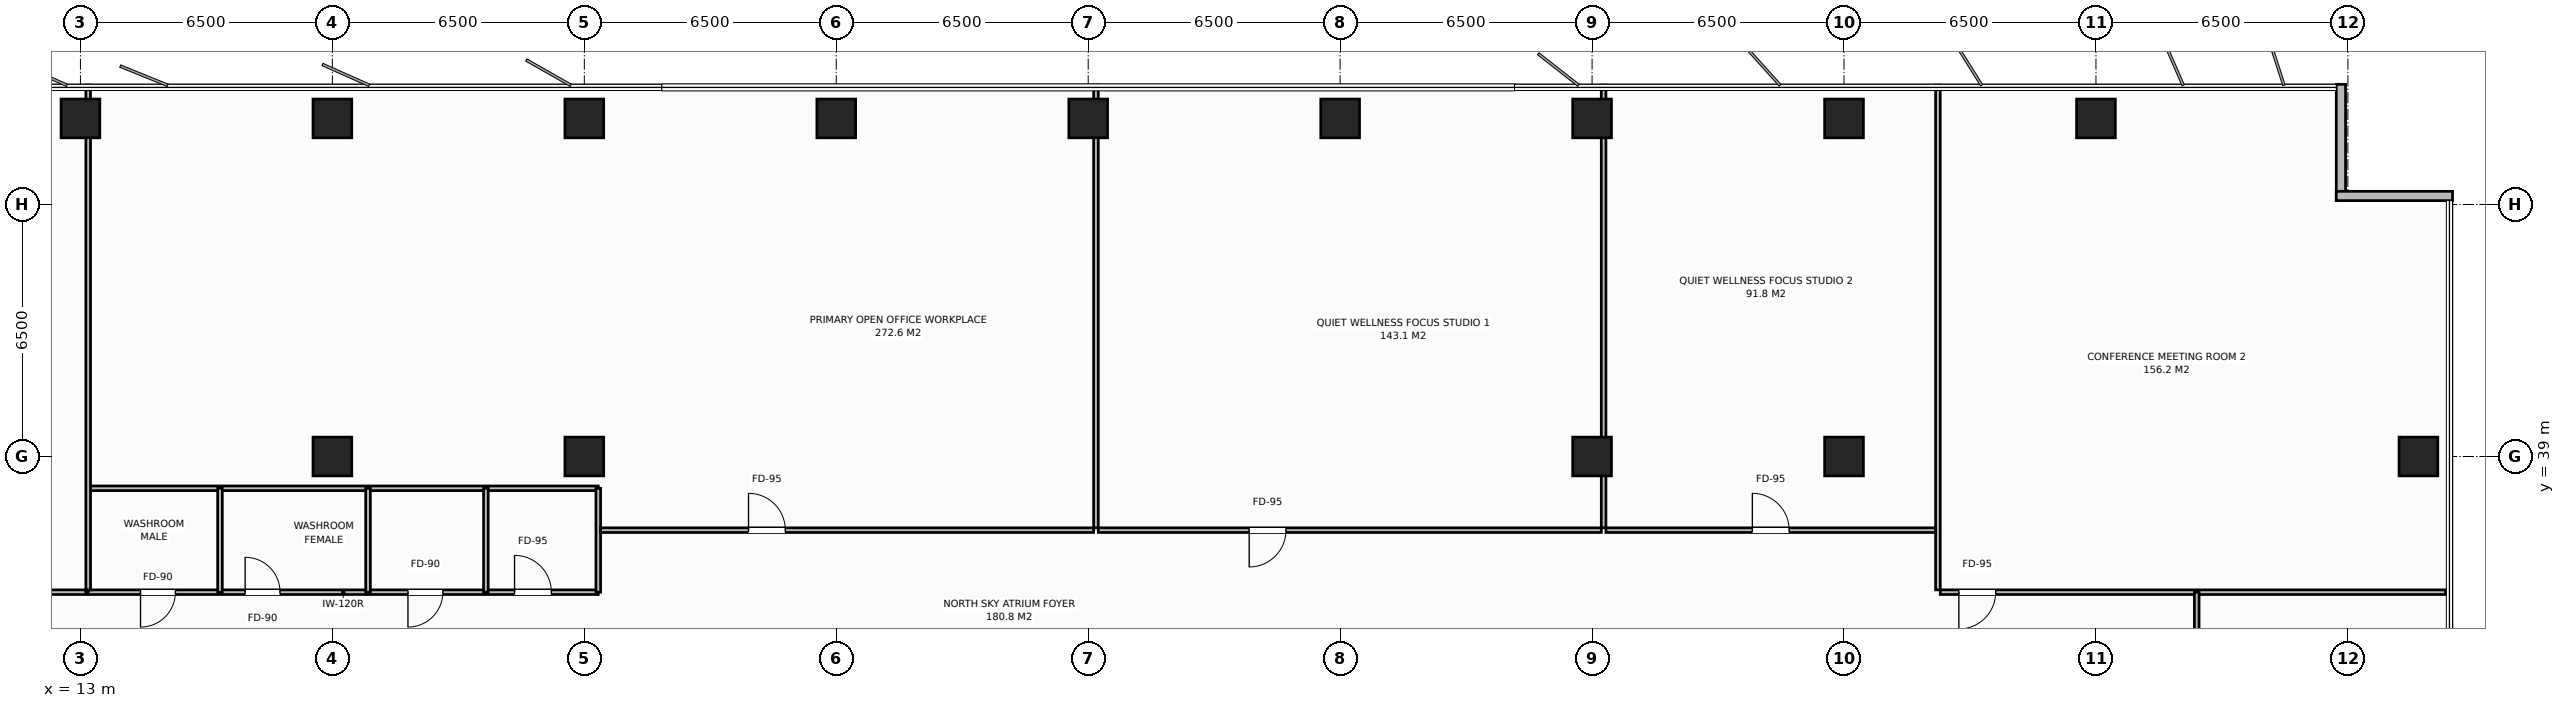
"""IFC4 building model, lengths in metres.
Left out: names, types, materials, properties, quantities, classifications, styles, units other than length and angle.
Written with IfcOpenShell. Run it as: python <this file> out.ifc"""

import sys

from ifc_helpers import new_model, si_unit, direction, frame, frame_2d, origin, origin_2d, place, context, subcontext, project, spatial, rectangle, extrude, element, fill, save


model = new_model("IFC4")
c1 = context("Model", 3, precision=1e-05, world=origin(), true_north=direction((0.0, 1.0)))
c2 = subcontext(c1, "Body", "Model", "MODEL_VIEW")
j1 = project(units=[si_unit("LENGTHUNIT", "METRE"), si_unit("PLANEANGLEUNIT", "RADIAN")], contexts=[c1])
p1 = place(None, origin())
s1 = spatial("IfcSite", under=j1, at=p1, CompositionType="ELEMENT")
p2 = place(p1, origin())
s2 = spatial("IfcBuilding", under=s1, at=p2, CompositionType="ELEMENT")
p3 = place(p2, frame((0.0, 0.0, 148.0)))
s3 = spatial("IfcBuildingStorey", under=s2, at=p3, CompositionType="ELEMENT", Elevation=148.0)
for number, where, z_axis, x_axis in (
    (1, (19.5, 39.0, 0.0), (0.0, 0.0, 1.0), (1.0, 0.0, 0.0)),
    (2, (58.5, 39.0, 0.0), (0.0, 0.0, 1.0), (1.0, 0.0, 0.0)),
    (3, (26.0, 39.0, 0.0), (0.0, 0.0, 1.0), (1.0, 0.0, 0.0)),
    (4, (52.0, 39.0, 0.0), (0.0, 0.0, 1.0), (1.0, 0.0, 0.0)),
    (5, (13.0, 47.72, 0.0), (0.0, 0.0, 1.0), (1.0, 0.0, 0.0)),
    (6, (19.5, 47.72, 0.0), (0.0, 0.0, 1.0), (1.0, 0.0, 0.0)),
    (7, (26.0, 47.72, 0.0), (0.0, 0.0, 1.0), (1.0, 0.0, 0.0)),
    (8, (32.5, 47.72, 0.0), (0.0, 0.0, 1.0), (1.0, 0.0, 0.0)),
    (9, (39.0, 47.72, 0.0), (0.0, 0.0, 1.0), (1.0, 0.0, 0.0)),
    (10, (45.5, 47.72, 0.0), (0.0, 0.0, 1.0), (1.0, 0.0, 0.0)),
    (11, (52.0, 47.72, 0.0), (0.0, 0.0, 1.0), (1.0, 0.0, 0.0)),
    (12, (58.5, 47.72, 0.0), (0.0, 0.0, 1.0), (1.0, 0.0, 0.0)),
    (13, (65.0, 47.72, 0.0), (0.0, 0.0, 1.0), (1.0, 0.0, 0.0)),
    (14, (73.32, 39.0, 0.0), (0.0, 0.0, 1.0), (1.0, 0.0, 0.0)),
):
    element("IfcColumn", number, at=place(p3, frame(where, z_axis=z_axis, x_axis=x_axis)), inside=s3, PredefinedType="COLUMN", context=c2, shape_type="SweptSolid", body=[
        extrude(rectangle(XDim=1.0, YDim=1.0, at=origin_2d()), origin(), (0.0, 0.0, 1.0), 3.8),
    ])
for number, where, z_axis, x_axis in (
    (15, (71.32, 48.6, 0.0), (0.0, 0.0, 1.0), (0.0, -1.0, 0.0)),
    (16, (71.2, 45.72, 0.0), (0.0, 0.0, 1.0), (1.0, 0.0, 0.0)),
):
    element("IfcWall", number, at=place(p3, frame(where, z_axis=z_axis, x_axis=x_axis)), inside=s3, PredefinedType="STANDARD", context=c2, shape_type="SweptSolid", body=[
        extrude(rectangle(XDim=3.0, YDim=0.24, at=frame_2d((1.5, 0.0))), origin(), (0.0, 0.0, 1.0), 3.572),
    ])
p4 = place(p3, frame((13.2, 35.5, 0.0), z_axis=(0.0, 0.0, 1.0), x_axis=(1.0, 0.0, 0.0)))
e17 = element("IfcWall", 17, at=p4, inside=s3, PredefinedType="PARTITIONING", context=c2, shape_type="SweptSolid", body=[
    extrude(rectangle(XDim=13.16, YDim=0.12, at=frame_2d((6.58, 0.0))), origin(), (0.0, 0.0, 1.0), 3.572),
])
p5 = place(p4, frame((1.35, 0.0, 0.0)))
e18 = element("IfcOpeningElement", 18, at=p5, cuts=e17, PredefinedType="OPENING", context=c2, shape_type="SweptSolid", body=[
    extrude(rectangle(XDim=0.9, YDim=2.15, at=frame_2d((0.45, 1.075))), frame((0.0, 0.07, 0.0), z_axis=(0.0, -1.0, 0.0), x_axis=(1.0, 0.0, 0.0)), (0.0, 0.0, 1.0), 0.14),
])
p6 = place(p4, frame((4.05, 0.0, 0.0)))
e19 = element("IfcOpeningElement", 19, at=p6, cuts=e17, PredefinedType="OPENING", context=c2, shape_type="SweptSolid", body=[
    extrude(rectangle(XDim=0.9, YDim=2.15, at=frame_2d((0.45, 1.075))), frame((0.0, 0.07, 0.0), z_axis=(0.0, -1.0, 0.0), x_axis=(1.0, 0.0, 0.0)), (0.0, 0.0, 1.0), 0.14),
])
p7 = place(p4, frame((8.25, 0.0, 0.0)))
e20 = element("IfcOpeningElement", 20, at=p7, cuts=e17, PredefinedType="OPENING", context=c2, shape_type="SweptSolid", body=[
    extrude(rectangle(XDim=0.9, YDim=2.15, at=frame_2d((0.45, 1.075))), frame((0.0, 0.07, 0.0), z_axis=(0.0, -1.0, 0.0), x_axis=(1.0, 0.0, 0.0)), (0.0, 0.0, 1.0), 0.14),
])
p8 = place(p4, frame((11.0, 0.0, 0.0)))
e21 = element("IfcOpeningElement", 21, at=p8, cuts=e17, PredefinedType="OPENING", context=c2, shape_type="SweptSolid", body=[
    extrude(rectangle(XDim=0.95, YDim=2.15, at=frame_2d((0.475, 1.075))), frame((0.0, 0.07, 0.0), z_axis=(0.0, -1.0, 0.0), x_axis=(1.0, 0.0, 0.0)), (0.0, 0.0, 1.0), 0.14),
])
p9 = place(p3, frame((13.2, 38.18, 0.0), z_axis=(0.0, 0.0, 1.0), x_axis=(1.0, 0.0, 0.0)))
e22 = element("IfcWall", 22, at=p9, inside=s3, PredefinedType="PARTITIONING", context=c2, shape_type="SweptSolid", body=[
    extrude(rectangle(XDim=13.16, YDim=0.12, at=frame_2d((6.58, 0.0))), origin(), (0.0, 0.0, 1.0), 3.572),
])
for number, where, z_axis, x_axis in (
    (23, (16.6, 35.5, 0.0), (0.0, 0.0, 1.0), (0.0, 1.0, 0.0)),
    (24, (20.42, 35.5, 0.0), (0.0, 0.0, 1.0), (0.0, 1.0, 0.0)),
    (25, (23.46, 35.5, 0.0), (0.0, 0.0, 1.0), (0.0, 1.0, 0.0)),
    (26, (26.36, 35.5, 0.0), (0.0, 0.0, 1.0), (0.0, 1.0, 0.0)),
):
    element("IfcWall", number, at=place(p3, frame(where, z_axis=z_axis, x_axis=x_axis)), inside=s3, PredefinedType="PARTITIONING", context=c2, shape_type="SweptSolid", body=[
        extrude(rectangle(XDim=2.68, YDim=0.12, at=frame_2d((1.34, 0.0))), origin(), (0.0, 0.0, 1.0), 3.572),
    ])
p10 = place(p3, frame((13.2, 35.56, 0.0), z_axis=(0.0, 0.0, 1.0), x_axis=(0.0, 1.0, 0.0)))
e27 = element("IfcWall", 27, at=p10, inside=s3, PredefinedType="PARTITIONING", context=c2, shape_type="SweptSolid", body=[
    extrude(rectangle(XDim=13.02, YDim=0.12, at=frame_2d((6.51, 0.0))), origin(), (0.0, 0.0, 1.0), 3.022),
])
p11 = place(p3, frame((3.98, 35.5, 0.0), z_axis=(0.0, 0.0, 1.0), x_axis=(1.0, 0.0, 0.0)))
e28 = element("IfcWall", 28, at=p11, inside=s3, PredefinedType="PARTITIONING", context=c2, shape_type="SweptSolid", body=[
    extrude(rectangle(XDim=9.16, YDim=0.12, at=frame_2d((4.58, 0.0))), origin(), (0.0, 0.0, 1.0), 3.572),
])
p12 = place(p11, frame((6.9, 0.0, 0.0)))
e29 = element("IfcOpeningElement", 29, at=p12, cuts=e28, PredefinedType="OPENING", context=c2, shape_type="SweptSolid", body=[
    extrude(rectangle(XDim=0.95, YDim=2.15, at=frame_2d((0.475, 1.075))), frame((0.0, 0.07, 0.0), z_axis=(0.0, -1.0, 0.0), x_axis=(1.0, 0.0, 0.0)), (0.0, 0.0, 1.0), 0.14),
])
p13 = place(p3, frame((39.2, 37.16, 0.0), z_axis=(0.0, 0.0, 1.0), x_axis=(0.0, 1.0, 0.0)))
e30 = element("IfcWall", 30, at=p13, inside=s3, PredefinedType="PARTITIONING", context=c2, shape_type="SweptSolid", body=[
    extrude(rectangle(XDim=11.42, YDim=0.12, at=frame_2d((5.71, 0.0))), origin(), (0.0, 0.0, 1.0), 3.022),
])
p14 = place(p3, frame((26.42, 37.1, 0.0), z_axis=(0.0, 0.0, 1.0), x_axis=(1.0, 0.0, 0.0)))
e31 = element("IfcWall", 31, at=p14, inside=s3, PredefinedType="PARTITIONING", context=c2, shape_type="SweptSolid", body=[
    extrude(rectangle(XDim=12.72, YDim=0.12, at=frame_2d((6.36, 0.0))), origin(), (0.0, 0.0, 1.0), 3.572),
])
p15 = place(p14, frame((3.816, 0.0, 0.0)))
e32 = element("IfcOpeningElement", 32, at=p15, cuts=e31, PredefinedType="OPENING", context=c2, shape_type="SweptSolid", body=[
    extrude(rectangle(XDim=0.95, YDim=2.15, at=frame_2d((0.475, 1.075))), frame((0.0, 0.07, 0.0), z_axis=(0.0, -1.0, 0.0), x_axis=(1.0, 0.0, 0.0)), (0.0, 0.0, 1.0), 0.14),
])
p16 = place(p3, frame((52.297, 37.16, 0.0), z_axis=(0.0, 0.0, 1.0), x_axis=(0.0, 1.0, 0.0)))
e33 = element("IfcWall", 33, at=p16, inside=s3, PredefinedType="PARTITIONING", context=c2, shape_type="SweptSolid", body=[
    extrude(rectangle(XDim=11.42, YDim=0.12, at=frame_2d((5.71, 0.0))), origin(), (0.0, 0.0, 1.0), 3.572),
])
p17 = place(p3, frame((39.26, 37.1, 0.0), z_axis=(0.0, 0.0, 1.0), x_axis=(1.0, 0.0, 0.0)))
e34 = element("IfcWall", 34, at=p17, inside=s3, PredefinedType="PARTITIONING", context=c2, shape_type="SweptSolid", body=[
    extrude(rectangle(XDim=12.977, YDim=0.12, at=frame_2d((6.489, 0.0))), origin(), (0.0, 0.0, 1.0), 3.572),
])
p18 = place(p17, frame((3.893, 0.0, 0.0)))
e35 = element("IfcOpeningElement", 35, at=p18, cuts=e34, PredefinedType="OPENING", context=c2, shape_type="SweptSolid", body=[
    extrude(rectangle(XDim=0.95, YDim=2.15, at=frame_2d((0.475, 1.075))), frame((0.0, 0.07, 0.0), z_axis=(0.0, -1.0, 0.0), x_axis=(1.0, 0.0, 0.0)), (0.0, 0.0, 1.0), 0.14),
])
p19 = place(p3, frame((60.923, 35.56, 0.0), z_axis=(0.0, 0.0, 1.0), x_axis=(0.0, 1.0, 0.0)))
e36 = element("IfcWall", 36, at=p19, inside=s3, PredefinedType="PARTITIONING", context=c2, shape_type="SweptSolid", body=[
    extrude(rectangle(XDim=13.02, YDim=0.12, at=frame_2d((6.51, 0.0))), origin(), (0.0, 0.0, 1.0), 3.572),
])
p20 = place(p3, frame((52.357, 37.1, 0.0), z_axis=(0.0, 0.0, 1.0), x_axis=(1.0, 0.0, 0.0)))
e37 = element("IfcWall", 37, at=p20, inside=s3, PredefinedType="PARTITIONING", context=c2, shape_type="SweptSolid", body=[
    extrude(rectangle(XDim=8.505, YDim=0.12, at=frame_2d((4.252, 0.0))), origin(), (0.0, 0.0, 1.0), 3.572),
])
p21 = place(p20, frame((3.778, 0.0, 0.0)))
e38 = element("IfcOpeningElement", 38, at=p21, cuts=e37, PredefinedType="OPENING", context=c2, shape_type="SweptSolid", body=[
    extrude(rectangle(XDim=0.95, YDim=2.15, at=frame_2d((0.475, 1.075))), frame((0.0, 0.07, 0.0), z_axis=(0.0, -1.0, 0.0), x_axis=(1.0, 0.0, 0.0)), (0.0, 0.0, 1.0), 0.14),
])
p22 = place(p3, frame((60.983, 35.5, 0.0), z_axis=(0.0, 0.0, 1.0), x_axis=(1.0, 0.0, 0.0)))
e39 = element("IfcWall", 39, at=p22, inside=s3, PredefinedType="PARTITIONING", context=c2, shape_type="SweptSolid", body=[
    extrude(rectangle(XDim=13.037, YDim=0.12, at=frame_2d((6.519, 0.0))), origin(), (0.0, 0.0, 1.0), 3.572),
])
p23 = place(p22, frame((0.48, 0.0, 0.0)))
e40 = element("IfcOpeningElement", 40, at=p23, cuts=e39, PredefinedType="OPENING", context=c2, shape_type="SweptSolid", body=[
    extrude(rectangle(XDim=0.95, YDim=2.15, at=frame_2d((0.475, 1.075))), frame((0.0, 0.07, 0.0), z_axis=(0.0, -1.0, 0.0), x_axis=(1.0, 0.0, 0.0)), (0.0, 0.0, 1.0), 0.14),
])
p24 = place(p3, frame((67.6, 16.5, 0.0), z_axis=(0.0, 0.0, 1.0), x_axis=(0.0, 1.0, 0.0)))
e41 = element("IfcWall", 41, at=p24, inside=s3, PredefinedType="PARTITIONING", context=c2, shape_type="SweptSolid", body=[
    extrude(rectangle(XDim=19.0, YDim=0.12, at=frame_2d((9.5, 0.0))), origin(), (0.0, 0.0, 1.0), 3.572),
])
p25 = place(p24, frame((9.025, 0.0, 0.0)))
e42 = element("IfcOpeningElement", 42, at=p25, cuts=e41, PredefinedType="OPENING", context=c2, shape_type="SweptSolid", body=[
    extrude(rectangle(XDim=0.95, YDim=2.15, at=frame_2d((0.475, 1.075))), frame((0.0, 0.07, 0.0), z_axis=(0.0, -1.0, 0.0), x_axis=(1.0, 0.0, 0.0)), (0.0, 0.0, 1.0), 0.14),
])
p26 = place(p5, origin())
e43 = element("IfcDoor", 43, at=p26, inside=s3, OperationType="SINGLE_SWING_RIGHT", PredefinedType="DOOR", context=c2, shape_type="SweptSolid", body=[
    extrude(rectangle(XDim=0.9, YDim=2.15, at=frame_2d((0.45, 1.075))), frame((0.0, 0.025, 0.0), z_axis=(0.0, -1.0, 0.0), x_axis=(1.0, 0.0, 0.0)), (0.0, 0.0, 1.0), 0.05),
])
fill(e18, e43)
p27 = place(p6, origin())
e44 = element("IfcDoor", 44, at=p27, inside=s3, OperationType="SINGLE_SWING_LEFT", PredefinedType="DOOR", context=c2, shape_type="SweptSolid", body=[
    extrude(rectangle(XDim=0.9, YDim=2.15, at=frame_2d((0.45, 1.075))), frame((0.0, 0.025, 0.0), z_axis=(0.0, -1.0, 0.0), x_axis=(1.0, 0.0, 0.0)), (0.0, 0.0, 1.0), 0.05),
])
fill(e19, e44)
p28 = place(p7, origin())
e45 = element("IfcDoor", 45, at=p28, inside=s3, OperationType="SINGLE_SWING_RIGHT", PredefinedType="DOOR", context=c2, shape_type="SweptSolid", body=[
    extrude(rectangle(XDim=0.9, YDim=2.15, at=frame_2d((0.45, 1.075))), frame((0.0, 0.025, 0.0), z_axis=(0.0, -1.0, 0.0), x_axis=(1.0, 0.0, 0.0)), (0.0, 0.0, 1.0), 0.05),
])
fill(e20, e45)
p29 = place(p8, origin())
e46 = element("IfcDoor", 46, at=p29, inside=s3, OperationType="SINGLE_SWING_LEFT", PredefinedType="DOOR", context=c2, shape_type="SweptSolid", body=[
    extrude(rectangle(XDim=0.95, YDim=2.15, at=frame_2d((0.475, 1.075))), frame((0.0, 0.025, 0.0), z_axis=(0.0, -1.0, 0.0), x_axis=(1.0, 0.0, 0.0)), (0.0, 0.0, 1.0), 0.05),
])
fill(e21, e46)
p30 = place(p15, origin())
e47 = element("IfcDoor", 47, at=p30, inside=s3, OperationType="SINGLE_SWING_LEFT", PredefinedType="DOOR", context=c2, shape_type="SweptSolid", body=[
    extrude(rectangle(XDim=0.95, YDim=2.15, at=frame_2d((0.475, 1.075))), frame((0.0, 0.025, 0.0), z_axis=(0.0, -1.0, 0.0), x_axis=(1.0, 0.0, 0.0)), (0.0, 0.0, 1.0), 0.05),
])
fill(e32, e47)
p31 = place(p18, origin())
e48 = element("IfcDoor", 48, at=p31, inside=s3, OperationType="SINGLE_SWING_RIGHT", PredefinedType="DOOR", context=c2, shape_type="SweptSolid", body=[
    extrude(rectangle(XDim=0.95, YDim=2.15, at=frame_2d((0.475, 1.075))), frame((0.0, 0.025, 0.0), z_axis=(0.0, -1.0, 0.0), x_axis=(1.0, 0.0, 0.0)), (0.0, 0.0, 1.0), 0.05),
])
fill(e35, e48)
p32 = place(p21, origin())
e49 = element("IfcDoor", 49, at=p32, inside=s3, OperationType="SINGLE_SWING_LEFT", PredefinedType="DOOR", context=c2, shape_type="SweptSolid", body=[
    extrude(rectangle(XDim=0.95, YDim=2.15, at=frame_2d((0.475, 1.075))), frame((0.0, 0.025, 0.0), z_axis=(0.0, -1.0, 0.0), x_axis=(1.0, 0.0, 0.0)), (0.0, 0.0, 1.0), 0.05),
])
fill(e38, e49)
p33 = place(p23, origin())
e50 = element("IfcDoor", 50, at=p33, inside=s3, OperationType="SINGLE_SWING_RIGHT", PredefinedType="DOOR", context=c2, shape_type="SweptSolid", body=[
    extrude(rectangle(XDim=0.95, YDim=2.15, at=frame_2d((0.475, 1.075))), frame((0.0, 0.025, 0.0), z_axis=(0.0, -1.0, 0.0), x_axis=(1.0, 0.0, 0.0)), (0.0, 0.0, 1.0), 0.05),
])
fill(e40, e50)
save(model, sys.argv[1])
